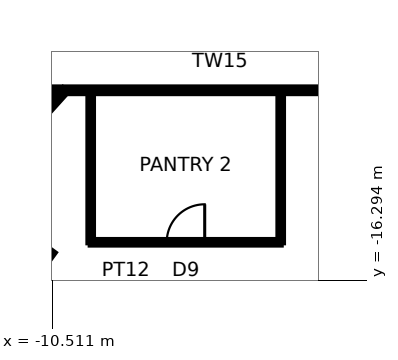
"""IFC4 building model, lengths in metres.
Left out: names, types, materials, properties, quantities, classifications, styles, units other than length and angle.
Written with IfcOpenShell. Run it as: python <this file> out.ifc"""

import sys

from ifc_helpers import new_model, si_unit, direction, frame, frame_2d, origin, origin_2d, place, context, subcontext, project, spatial, rectangle, extrude, element, fill, save


model = new_model("IFC4")
c1 = context("Model", 3, precision=1e-05, world=origin(), true_north=direction((0.0, 1.0)))
c2 = subcontext(c1, "Body", "Model", "MODEL_VIEW")
j1 = project(units=[si_unit("LENGTHUNIT", "METRE"), si_unit("PLANEANGLEUNIT", "RADIAN")], contexts=[c1])
p1 = place(None, origin())
s1 = spatial("IfcSite", under=j1, at=p1, CompositionType="ELEMENT")
p2 = place(p1, origin())
s2 = spatial("IfcBuilding", under=s1, at=p2, CompositionType="ELEMENT")
p3 = place(p2, frame((0.0, 0.0, 207.2)))
s3 = spatial("IfcBuildingStorey", under=s2, at=p3, CompositionType="ELEMENT", Elevation=207.2)
p4 = place(p3, frame((-11.43, -15.733, 0.0), z_axis=(0.0, 0.0, 1.0), x_axis=(-0.587785252292, -0.809016994375, 0.0)))
e1 = element("IfcColumn", 1, at=p4, inside=s3, PredefinedType="COLUMN", context=c2, shape_type="SweptSolid", body=[
    extrude(rectangle(XDim=1.4, YDim=1.4, at=origin_2d()), origin(), (0.0, 0.0, 1.0), 3.9),
])
p5 = place(p3, frame((-14.627, -16.245, 0.0), z_axis=(0.0, 0.0, 1.0), x_axis=(0.669116748293, 0.743157303102, 0.0)))
e2 = element("IfcWall", 2, at=p5, inside=s3, PredefinedType="PARTITIONING", context=c2, shape_type="SweptSolid", body=[
    extrude(rectangle(XDim=6.654, YDim=0.15, at=frame_2d((3.327, 0.0))), origin(), (0.0, 0.0, 1.0), 3.74),
])
p6 = place(p3, frame((-9.5, -11.3, 0.0), z_axis=(0.0, 0.0, 1.0), x_axis=(0.0, -1.0, 0.0)))
e3 = element("IfcWall", 3, at=p6, inside=s3, PredefinedType="PARTITIONING", context=c2, shape_type="SweptSolid", body=[
    extrude(rectangle(XDim=4.0, YDim=0.12, at=frame_2d((2.0, 0.0))), origin(), (0.0, 0.0, 1.0), 3.74),
])
p7 = place(p3, frame((-14.2, -11.3, 0.0), z_axis=(0.0, 0.0, 1.0), x_axis=(1.0, 0.0, 0.0)))
e4 = element("IfcWall", 4, at=p7, inside=s3, PredefinedType="PARTITIONING", context=c2, shape_type="SweptSolid", body=[
    extrude(rectangle(XDim=16.2, YDim=0.15, at=frame_2d((8.1, 0.0))), origin(), (0.0, 0.0, 1.0), 3.74),
])
p8 = place(p3, frame((-9.5, -15.3, 0.0), z_axis=(0.0, 0.0, 1.0), x_axis=(1.0, 0.0, 0.0)))
e5 = element("IfcWall", 5, at=p8, inside=s3, PredefinedType="PARTITIONING", context=c2, shape_type="SweptSolid", body=[
    extrude(rectangle(XDim=5.0, YDim=0.12, at=frame_2d((2.5, 0.0))), origin(), (0.0, 0.0, 1.0), 3.334),
])
p9 = place(p8, frame((2.0, 0.0, 0.0)))
e6 = element("IfcOpeningElement", 6, at=p9, cuts=e5, PredefinedType="OPENING", context=c2, shape_type="SweptSolid", body=[
    extrude(rectangle(XDim=1.0, YDim=2.4, at=frame_2d((0.5, 1.2))), frame((0.0, 0.07, 0.0), z_axis=(0.0, -1.0, 0.0), x_axis=(1.0, 0.0, 0.0)), (0.0, 0.0, 1.0), 0.14),
])
p10 = place(p3, frame((-4.5, -15.3, 0.0), z_axis=(0.0, 0.0, 1.0), x_axis=(0.0, 1.0, 0.0)))
e7 = element("IfcWall", 7, at=p10, inside=s3, PredefinedType="PARTITIONING", context=c2, shape_type="SweptSolid", body=[
    extrude(rectangle(XDim=4.0, YDim=0.12, at=frame_2d((2.0, 0.0))), origin(), (0.0, 0.0, 1.0), 3.74),
])
p11 = place(p9, origin())
e8 = element("IfcDoor", 8, at=p11, inside=s3, OperationType="SINGLE_SWING_RIGHT", PredefinedType="DOOR", context=c2, shape_type="SweptSolid", body=[
    extrude(rectangle(XDim=1.0, YDim=2.4, at=frame_2d((0.5, 1.2))), frame((0.0, 0.025, 0.0), z_axis=(0.0, -1.0, 0.0), x_axis=(1.0, 0.0, 0.0)), (0.0, 0.0, 1.0), 0.05),
])
fill(e6, e8)
save(model, sys.argv[1])
